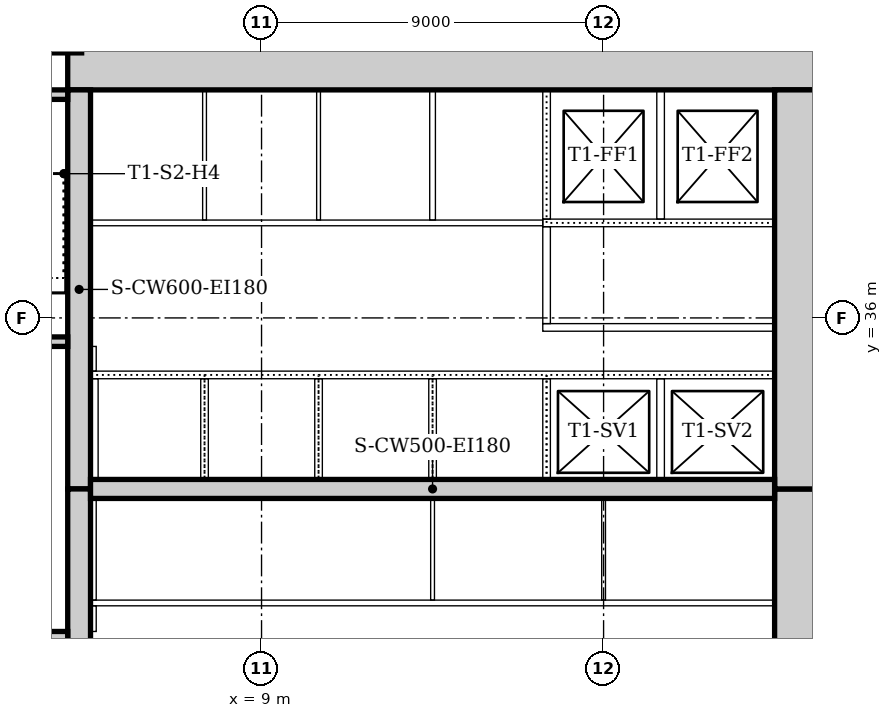
"""IFC4 building model, lengths in metres.
Left out: names, types, materials, properties, quantities, classifications, styles, units other than length and angle.
Written with IfcOpenShell. Run it as: python <this file> out.ifc"""

import sys

from ifc_helpers import new_model, si_unit, direction, frame, frame_2d, origin, origin_2d, place, context, subcontext, project, spatial, rectangle, extrude, element, fill, save


model = new_model("IFC4")
c1 = context("Model", 3, precision=1e-05, world=origin(), true_north=direction((0.0, 1.0)))
c2 = subcontext(c1, "Body", "Model", "MODEL_VIEW")
j1 = project(units=[si_unit("LENGTHUNIT", "METRE"), si_unit("PLANEANGLEUNIT", "RADIAN")], contexts=[c1])
p1 = place(None, origin())
s1 = spatial("IfcSite", under=j1, at=p1, CompositionType="ELEMENT")
p2 = place(p1, origin())
s2 = spatial("IfcBuilding", under=s1, at=p2, CompositionType="ELEMENT")
p3 = place(p2, frame((0.0, 0.0, -5.0)))
s3 = spatial("IfcBuildingStorey", under=s2, at=p3, CompositionType="ELEMENT", Elevation=-5.0)
p4 = place(p3, frame((23.7, 42.6, 0.0), z_axis=(0.0, 0.0, 1.0), x_axis=(-1.0, 0.0, 0.0)))
e1 = element("IfcWall", 1, at=p4, inside=s3, PredefinedType="SOLIDWALL", context=c2, shape_type="SweptSolid", body=[
    extrude(rectangle(XDim=19.8, YDim=1.2, at=frame_2d((9.9, 0.0))), origin(), (0.0, 0.0, 1.0), 5.0),
])
p5 = place(p3, frame((23.1, 21.0, 0.0), z_axis=(0.0, 0.0, 1.0), x_axis=(0.0, 1.0, 0.0)))
e2 = element("IfcWall", 2, at=p5, inside=s3, PredefinedType="SOLIDWALL", context=c2, shape_type="SweptSolid", body=[
    extrude(rectangle(XDim=10.5, YDim=1.2, at=frame_2d((5.25, 0.0))), origin(), (0.0, 0.0, 1.0), 5.0),
])
p6 = place(p5, frame((4.35, 0.0, 0.0)))
e3 = element("IfcOpeningElement", 3, at=p6, cuts=e2, PredefinedType="OPENING", context=c2, shape_type="SweptSolid", body=[
    extrude(rectangle(XDim=1.8, YDim=2.1, at=frame_2d((0.9, 1.05))), frame((0.0, 0.61, 0.0), z_axis=(0.0, -1.0, 0.0), x_axis=(1.0, 0.0, 0.0)), (0.0, 0.0, 1.0), 1.22),
])
p7 = place(p3, frame((23.1, 31.5, 0.0), z_axis=(0.0, 0.0, 1.0), x_axis=(0.0, 1.0, 0.0)))
e4 = element("IfcWall", 4, at=p7, inside=s3, PredefinedType="SOLIDWALL", context=c2, shape_type="SweptSolid", body=[
    extrude(rectangle(XDim=10.5, YDim=1.2, at=frame_2d((5.25, 0.0))), origin(), (0.0, 0.0, 1.0), 5.0),
])
p8 = place(p7, frame((3.15, 0.0, 0.0)))
e5 = element("IfcOpeningElement", 5, at=p8, cuts=e4, PredefinedType="OPENING", context=c2, shape_type="SweptSolid", body=[
    extrude(rectangle(XDim=1.0, YDim=2.1, at=frame_2d((0.5, 1.05))), frame((0.0, 0.61, 0.0), z_axis=(0.0, -1.0, 0.0), x_axis=(1.0, 0.0, 0.0)), (0.0, 0.0, 1.0), 1.22),
])
p9 = place(p7, frame((5.2, 0.0, 0.0)))
e6 = element("IfcOpeningElement", 6, at=p9, cuts=e4, PredefinedType="OPENING", context=c2, shape_type="SweptSolid", body=[
    extrude(rectangle(XDim=1.0, YDim=2.1, at=frame_2d((0.5, 1.05))), frame((0.0, 0.61, 0.0), z_axis=(0.0, -1.0, 0.0), x_axis=(1.0, 0.0, 0.0)), (0.0, 0.0, 1.0), 1.22),
])
p10 = place(p3, frame((4.2, 42.0, 0.0), z_axis=(0.0, 0.0, 1.0), x_axis=(0.0, -1.0, 0.0)))
e7 = element("IfcWall", 7, at=p10, inside=s3, PredefinedType="SOLIDWALL", context=c2, shape_type="SweptSolid", body=[
    extrude(rectangle(XDim=10.5, YDim=0.6, at=frame_2d((5.25, 0.0))), origin(), (0.0, 0.0, 1.0), 5.0),
])
p11 = place(p10, frame((5.3, 0.0, 0.0)))
e8 = element("IfcOpeningElement", 8, at=p11, cuts=e7, PredefinedType="OPENING", context=c2, shape_type="SweptSolid", body=[
    extrude(rectangle(XDim=1.0, YDim=2.1, at=frame_2d((0.5, 1.05))), frame((0.0, 0.31, 0.0), z_axis=(0.0, -1.0, 0.0), x_axis=(1.0, 0.0, 0.0)), (0.0, 0.0, 1.0), 0.62),
])
p12 = place(p3, frame((4.2, 31.5, 0.0), z_axis=(0.0, 0.0, 1.0), x_axis=(0.0, -1.0, 0.0)))
e9 = element("IfcWall", 9, at=p12, inside=s3, PredefinedType="SOLIDWALL", context=c2, shape_type="SweptSolid", body=[
    extrude(rectangle(XDim=10.5, YDim=0.6, at=frame_2d((5.25, 0.0))), origin(), (0.0, 0.0, 1.0), 5.0),
])
p13 = place(p12, frame((4.25, 0.0, 0.0)))
e10 = element("IfcOpeningElement", 10, at=p13, cuts=e9, PredefinedType="OPENING", context=c2, shape_type="SweptSolid", body=[
    extrude(rectangle(XDim=1.0, YDim=2.1, at=frame_2d((0.5, 1.05))), frame((0.0, 0.31, 0.0), z_axis=(0.0, -1.0, 0.0), x_axis=(1.0, 0.0, 0.0)), (0.0, 0.0, 1.0), 0.62),
])
p14 = place(p3, frame((4.5, 31.5, 0.0), z_axis=(0.0, 0.0, 1.0), x_axis=(1.0, 0.0, 0.0)))
e11 = element("IfcWall", 11, at=p14, inside=s3, PredefinedType="SOLIDWALL", context=c2, shape_type="SweptSolid", body=[
    extrude(rectangle(XDim=18.0, YDim=0.5, at=frame_2d((9.0, 0.0))), origin(), (0.0, 0.0, 1.0), 5.0),
])
p15 = place(p3, frame((3.9, 27.625, 0.0), z_axis=(0.0, 0.0, 1.0), x_axis=(-1.0, 0.0, 0.0)))
e12 = element("IfcWall", 12, at=p15, inside=s3, PredefinedType="SOLIDWALL", context=c2, shape_type="SweptSolid", body=[
    extrude(rectangle(XDim=3.54, YDim=0.25, at=frame_2d((1.77, 0.0))), origin(), (0.0, 0.0, 1.0), 5.0),
])
p16 = place(p15, frame((0.4, 0.0, 0.0)))
e13 = element("IfcOpeningElement", 13, at=p16, cuts=e12, PredefinedType="OPENING", context=c2, shape_type="SweptSolid", body=[
    extrude(rectangle(XDim=1.0, YDim=2.1, at=frame_2d((0.5, 1.05))), frame((0.0, 0.135, 0.0), z_axis=(0.0, -1.0, 0.0), x_axis=(1.0, 0.0, 0.0)), (0.0, 0.0, 1.0), 0.27),
])
p17 = place(p3, frame((0.36, 35.375, 0.0), z_axis=(0.0, 0.0, 1.0), x_axis=(1.0, 0.0, 0.0)))
e14 = element("IfcWall", 14, at=p17, inside=s3, PredefinedType="SOLIDWALL", context=c2, shape_type="SweptSolid", body=[
    extrude(rectangle(XDim=3.54, YDim=0.25, at=frame_2d((1.77, 0.0))), origin(), (0.0, 0.0, 1.0), 5.0),
])
p18 = place(p17, frame((2.14, 0.0, 0.0)))
e15 = element("IfcOpeningElement", 15, at=p18, cuts=e14, PredefinedType="OPENING", context=c2, shape_type="SweptSolid", body=[
    extrude(rectangle(XDim=1.0, YDim=2.1, at=frame_2d((0.5, 1.05))), frame((0.0, 0.135, 0.0), z_axis=(0.0, -1.0, 0.0), x_axis=(1.0, 0.0, 0.0)), (0.0, 0.0, 1.0), 0.27),
])
p19 = place(p3, frame((3.9, 41.875, 0.0), z_axis=(0.0, 0.0, 1.0), x_axis=(-1.0, 0.0, 0.0)))
e16 = element("IfcWall", 16, at=p19, inside=s3, PredefinedType="SOLIDWALL", context=c2, shape_type="SweptSolid", body=[
    extrude(rectangle(XDim=3.54, YDim=0.25, at=frame_2d((1.77, 0.0))), origin(), (0.0, 0.0, 1.0), 5.0),
])
p20 = place(p3, frame((3.667, 43.574, 0.0), z_axis=(0.0, 0.0, 1.0), x_axis=(1.0, 0.0, 0.0)))
e17 = element("IfcColumn", 17, at=p20, inside=s3, PredefinedType="COLUMN", context=c2, shape_type="SweptSolid", body=[
    extrude(rectangle(XDim=1.2, YDim=1.2, at=origin_2d()), origin(), (0.0, 0.0, 1.0), 4.7),
])
p21 = place(p3, frame((16.4, 35.75, 0.0), z_axis=(0.0, 0.0, 1.0), x_axis=(1.0, 0.0, 0.0)))
e18 = element("IfcWall", 18, at=p21, inside=s3, PredefinedType="PARTITIONING", context=c2, shape_type="SweptSolid", body=[
    extrude(rectangle(XDim=6.1, YDim=0.2, at=frame_2d((3.05, 0.0))), origin(), (0.0, 0.0, 1.0), 4.7),
])
p22 = place(p3, frame((16.4, 38.5, 0.0), z_axis=(0.0, 0.0, 1.0), x_axis=(1.0, 0.0, 0.0)))
e19 = element("IfcWall", 19, at=p22, inside=s3, PredefinedType="PARTITIONING", context=c2, shape_type="SweptSolid", body=[
    extrude(rectangle(XDim=6.1, YDim=0.2, at=frame_2d((3.05, 0.0))), origin(), (0.0, 0.0, 1.0), 4.7),
])
p23 = place(p22, frame((1.0, 0.0, 0.0)))
e20 = element("IfcOpeningElement", 20, at=p23, cuts=e19, PredefinedType="OPENING", context=c2, shape_type="SweptSolid", body=[
    extrude(rectangle(XDim=1.2, YDim=2.1, at=frame_2d((0.6, 1.05))), frame((0.0, 0.11, 0.0), z_axis=(0.0, -1.0, 0.0), x_axis=(1.0, 0.0, 0.0)), (0.0, 0.0, 1.0), 0.22),
])
p24 = place(p22, frame((4.0, 0.0, 0.0)))
e21 = element("IfcOpeningElement", 21, at=p24, cuts=e19, PredefinedType="OPENING", context=c2, shape_type="SweptSolid", body=[
    extrude(rectangle(XDim=1.2, YDim=2.1, at=frame_2d((0.6, 1.05))), frame((0.0, 0.11, 0.0), z_axis=(0.0, -1.0, 0.0), x_axis=(1.0, 0.0, 0.0)), (0.0, 0.0, 1.0), 0.22),
])
p25 = place(p3, frame((16.5, 35.85, 0.0), z_axis=(0.0, 0.0, 1.0), x_axis=(0.0, 1.0, 0.0)))
e22 = element("IfcWall", 22, at=p25, inside=s3, PredefinedType="PARTITIONING", context=c2, shape_type="SweptSolid", body=[
    extrude(rectangle(XDim=2.55, YDim=0.2, at=frame_2d((1.275, 0.0))), origin(), (0.0, 0.0, 1.0), 4.7),
])
p26 = place(p3, frame((4.5, 34.5, 0.0), z_axis=(0.0, 0.0, 1.0), x_axis=(1.0, 0.0, 0.0)))
e23 = element("IfcWall", 23, at=p26, inside=s3, PredefinedType="PARTITIONING", context=c2, shape_type="SweptSolid", body=[
    extrude(rectangle(XDim=18.0, YDim=0.2, at=frame_2d((9.0, 0.0))), origin(), (0.0, 0.0, 1.0), 4.7),
])
p27 = place(p26, frame((12.95, 0.0, 0.0)))
e24 = element("IfcOpeningElement", 24, at=p27, cuts=e23, PredefinedType="OPENING", context=c2, shape_type="SweptSolid", body=[
    extrude(rectangle(XDim=1.1, YDim=2.1, at=frame_2d((0.55, 1.05))), frame((0.0, 0.11, 0.0), z_axis=(0.0, -1.0, 0.0), x_axis=(1.0, 0.0, 0.0)), (0.0, 0.0, 1.0), 0.22),
])
p28 = place(p26, frame((15.95, 0.0, 0.0)))
e25 = element("IfcOpeningElement", 25, at=p28, cuts=e23, PredefinedType="OPENING", context=c2, shape_type="SweptSolid", body=[
    extrude(rectangle(XDim=1.1, YDim=2.1, at=frame_2d((0.55, 1.05))), frame((0.0, 0.11, 0.0), z_axis=(0.0, -1.0, 0.0), x_axis=(1.0, 0.0, 0.0)), (0.0, 0.0, 1.0), 0.22),
])
for number, where, z_axis, x_axis in (
    (26, (16.5, 38.6, 0.0), (0.0, 0.0, 1.0), (0.0, 1.0, 0.0)),
    (27, (19.5, 38.6, 0.0), (0.0, 0.0, 1.0), (0.0, 1.0, 0.0)),
):
    element("IfcWall", number, at=place(p3, frame(where, z_axis=z_axis, x_axis=x_axis)), inside=s3, PredefinedType="PARTITIONING", context=c2, shape_type="SweptSolid", body=[
        extrude(rectangle(XDim=3.4, YDim=0.2, at=frame_2d((1.7, 0.0))), origin(), (0.0, 0.0, 1.0), 4.7),
    ])
for number, where, z_axis, x_axis in (
    (28, (4.6, 31.75, 0.0), (0.0, 0.0, 1.0), (0.0, 1.0, 0.0)),
    (29, (7.5, 31.75, 0.0), (0.0, 0.0, 1.0), (0.0, 1.0, 0.0)),
    (30, (10.5, 31.75, 0.0), (0.0, 0.0, 1.0), (0.0, 1.0, 0.0)),
    (31, (13.5, 31.75, 0.0), (0.0, 0.0, 1.0), (0.0, 1.0, 0.0)),
    (32, (16.5, 31.75, 0.0), (0.0, 0.0, 1.0), (0.0, 1.0, 0.0)),
    (33, (19.5, 31.75, 0.0), (0.0, 0.0, 1.0), (0.0, 1.0, 0.0)),
):
    element("IfcWall", number, at=place(p3, frame(where, z_axis=z_axis, x_axis=x_axis)), inside=s3, PredefinedType="PARTITIONING", context=c2, shape_type="SweptSolid", body=[
        extrude(rectangle(XDim=2.65, YDim=0.2, at=frame_2d((1.325, 0.0))), origin(), (0.0, 0.0, 1.0), 4.7),
    ])
p29 = place(p3, frame((4.5, 28.5, 0.0), z_axis=(0.0, 0.0, 1.0), x_axis=(1.0, 0.0, 0.0)))
e34 = element("IfcWall", 34, at=p29, inside=s3, PredefinedType="PARTITIONING", context=c2, shape_type="SweptSolid", body=[
    extrude(rectangle(XDim=18.0, YDim=0.15, at=frame_2d((9.0, 0.0))), origin(), (0.0, 0.0, 1.0), 4.7),
])
p30 = place(p29, frame((4.1, 0.0, 0.0)))
e35 = element("IfcOpeningElement", 35, at=p30, cuts=e34, PredefinedType="OPENING", context=c2, shape_type="SweptSolid", body=[
    extrude(rectangle(XDim=0.9, YDim=2.1, at=frame_2d((0.45, 1.05))), frame((0.0, 0.085, 0.0), z_axis=(0.0, -1.0, 0.0), x_axis=(1.0, 0.0, 0.0)), (0.0, 0.0, 1.0), 0.17),
])
p31 = place(p29, frame((10.8, 0.0, 0.0)))
e36 = element("IfcOpeningElement", 36, at=p31, cuts=e34, PredefinedType="OPENING", context=c2, shape_type="SweptSolid", body=[
    extrude(rectangle(XDim=0.9, YDim=2.1, at=frame_2d((0.45, 1.05))), frame((0.0, 0.085, 0.0), z_axis=(0.0, -1.0, 0.0), x_axis=(1.0, 0.0, 0.0)), (0.0, 0.0, 1.0), 0.17),
])
p32 = place(p29, frame((15.2, 0.0, 0.0)))
e37 = element("IfcOpeningElement", 37, at=p32, cuts=e34, PredefinedType="OPENING", context=c2, shape_type="SweptSolid", body=[
    extrude(rectangle(XDim=0.9, YDim=2.1, at=frame_2d((0.45, 1.05))), frame((0.0, 0.085, 0.0), z_axis=(0.0, -1.0, 0.0), x_axis=(1.0, 0.0, 0.0)), (0.0, 0.0, 1.0), 0.17),
])
p33 = place(p3, frame((4.5, 38.5, 0.0), z_axis=(0.0, 0.0, 1.0), x_axis=(1.0, 0.0, 0.0)))
e38 = element("IfcWall", 38, at=p33, inside=s3, PredefinedType="PARTITIONING", context=c2, shape_type="SweptSolid", body=[
    extrude(rectangle(XDim=11.9, YDim=0.15, at=frame_2d((5.95, 0.0))), origin(), (0.0, 0.0, 1.0), 4.7),
])
p34 = place(p33, frame((1.1, 0.0, 0.0)))
e39 = element("IfcOpeningElement", 39, at=p34, cuts=e38, PredefinedType="OPENING", context=c2, shape_type="SweptSolid", body=[
    extrude(rectangle(XDim=0.9, YDim=2.1, at=frame_2d((0.45, 1.05))), frame((0.0, 0.085, 0.0), z_axis=(0.0, -1.0, 0.0), x_axis=(1.0, 0.0, 0.0)), (0.0, 0.0, 1.0), 0.17),
])
p35 = place(p33, frame((4.05, 0.0, 0.0)))
e40 = element("IfcOpeningElement", 40, at=p35, cuts=e38, PredefinedType="OPENING", context=c2, shape_type="SweptSolid", body=[
    extrude(rectangle(XDim=0.9, YDim=2.1, at=frame_2d((0.45, 1.05))), frame((0.0, 0.085, 0.0), z_axis=(0.0, -1.0, 0.0), x_axis=(1.0, 0.0, 0.0)), (0.0, 0.0, 1.0), 0.17),
])
p36 = place(p33, frame((7.05, 0.0, 0.0)))
e41 = element("IfcOpeningElement", 41, at=p36, cuts=e38, PredefinedType="OPENING", context=c2, shape_type="SweptSolid", body=[
    extrude(rectangle(XDim=0.9, YDim=2.1, at=frame_2d((0.45, 1.05))), frame((0.0, 0.085, 0.0), z_axis=(0.0, -1.0, 0.0), x_axis=(1.0, 0.0, 0.0)), (0.0, 0.0, 1.0), 0.17),
])
p37 = place(p33, frame((9.95, 0.0, 0.0)))
e42 = element("IfcOpeningElement", 42, at=p37, cuts=e38, PredefinedType="OPENING", context=c2, shape_type="SweptSolid", body=[
    extrude(rectangle(XDim=0.8, YDim=2.1, at=frame_2d((0.4, 1.05))), frame((0.0, 0.085, 0.0), z_axis=(0.0, -1.0, 0.0), x_axis=(1.0, 0.0, 0.0)), (0.0, 0.0, 1.0), 0.17),
])
p38 = place(p3, frame((4.575, 27.75, 0.0), z_axis=(0.0, 0.0, 1.0), x_axis=(0.0, 1.0, 0.0)))
e43 = element("IfcWall", 43, at=p38, inside=s3, PredefinedType="PARTITIONING", context=c2, shape_type="SweptSolid", body=[
    extrude(rectangle(XDim=0.675, YDim=0.15, at=frame_2d((0.338, 0.0))), origin(), (0.0, 0.0, 1.0), 4.7),
])
p39 = place(p3, frame((4.575, 28.575, 0.0), z_axis=(0.0, 0.0, 1.0), x_axis=(0.0, 1.0, 0.0)))
e44 = element("IfcWall", 44, at=p39, inside=s3, PredefinedType="PARTITIONING", context=c2, shape_type="SweptSolid", body=[
    extrude(rectangle(XDim=2.675, YDim=0.15, at=frame_2d((1.337, 0.0))), origin(), (0.0, 0.0, 1.0), 4.7),
])
p40 = place(p3, frame((4.575, 34.6, 0.0), z_axis=(0.0, 0.0, 1.0), x_axis=(0.0, 1.0, 0.0)))
e45 = element("IfcWall", 45, at=p40, inside=s3, PredefinedType="PARTITIONING", context=c2, shape_type="SweptSolid", body=[
    extrude(rectangle(XDim=0.65, YDim=0.15, at=frame_2d((0.325, 0.0))), origin(), (0.0, 0.0, 1.0), 4.7),
])
p41 = place(p3, frame((13.5, 38.575, 0.0), z_axis=(0.0, 0.0, 1.0), x_axis=(0.0, 1.0, 0.0)))
e46 = element("IfcWall", 46, at=p41, inside=s3, PredefinedType="PARTITIONING", context=c2, shape_type="SweptSolid", body=[
    extrude(rectangle(XDim=3.425, YDim=0.15, at=frame_2d((1.712, 0.0))), origin(), (0.0, 0.0, 1.0), 4.7),
])
for number, where, z_axis, x_axis in (
    (47, (7.5, 38.575, 0.0), (0.0, 0.0, 1.0), (0.0, 1.0, 0.0)),
    (48, (10.5, 38.575, 0.0), (0.0, 0.0, 1.0), (0.0, 1.0, 0.0)),
):
    element("IfcWall", number, at=place(p3, frame(where, z_axis=z_axis, x_axis=x_axis)), inside=s3, PredefinedType="PARTITIONING", context=c2, shape_type="SweptSolid", body=[
        extrude(rectangle(XDim=3.425, YDim=0.1, at=frame_2d((1.712, 0.0))), origin(), (0.0, 0.0, 1.0), 4.7),
    ])
for number, where, z_axis, x_axis in (
    (49, (13.5, 28.575, 0.0), (0.0, 0.0, 1.0), (0.0, 1.0, 0.0)),
    (50, (18.0, 28.575, 0.0), (0.0, 0.0, 1.0), (0.0, 1.0, 0.0)),
):
    element("IfcWall", number, at=place(p3, frame(where, z_axis=z_axis, x_axis=x_axis)), inside=s3, PredefinedType="PARTITIONING", context=c2, shape_type="SweptSolid", body=[
        extrude(rectangle(XDim=2.675, YDim=0.1, at=frame_2d((1.337, 0.0))), origin(), (0.0, 0.0, 1.0), 4.7),
    ])
p42 = place(p11, frame((1.0, 0.0, 0.0), z_axis=(0.0, 0.0, 1.0), x_axis=(-1.0, 0.0, 0.0)))
e51 = element("IfcDoor", 51, at=p42, inside=s3, OperationType="SINGLE_SWING_LEFT", PredefinedType="DOOR", context=c2, shape_type="SweptSolid", body=[
    extrude(rectangle(XDim=1.0, YDim=2.1, at=frame_2d((0.5, 1.05))), frame((0.0, 0.025, 0.0), z_axis=(0.0, -1.0, 0.0), x_axis=(1.0, 0.0, 0.0)), (0.0, 0.0, 1.0), 0.05),
])
fill(e8, e51)
p43 = place(p27, origin())
e52 = element("IfcDoor", 52, at=p43, inside=s3, OperationType="SLIDING_TO_LEFT", PredefinedType="DOOR", context=c2, shape_type="SweptSolid", body=[
    extrude(rectangle(XDim=1.1, YDim=2.1, at=frame_2d((0.55, 1.05))), frame((0.0, 0.025, 0.0), z_axis=(0.0, -1.0, 0.0), x_axis=(1.0, 0.0, 0.0)), (0.0, 0.0, 1.0), 0.05),
])
fill(e24, e52)
p44 = place(p28, origin())
e53 = element("IfcDoor", 53, at=p44, inside=s3, OperationType="SLIDING_TO_LEFT", PredefinedType="DOOR", context=c2, shape_type="SweptSolid", body=[
    extrude(rectangle(XDim=1.1, YDim=2.1, at=frame_2d((0.55, 1.05))), frame((0.0, 0.025, 0.0), z_axis=(0.0, -1.0, 0.0), x_axis=(1.0, 0.0, 0.0)), (0.0, 0.0, 1.0), 0.05),
])
fill(e25, e53)
p45 = place(p23, origin())
e54 = element("IfcDoor", 54, at=p45, inside=s3, OperationType="SLIDING_TO_LEFT", PredefinedType="DOOR", context=c2, shape_type="SweptSolid", body=[
    extrude(rectangle(XDim=1.2, YDim=2.1, at=frame_2d((0.6, 1.05))), frame((0.0, 0.025, 0.0), z_axis=(0.0, -1.0, 0.0), x_axis=(1.0, 0.0, 0.0)), (0.0, 0.0, 1.0), 0.05),
])
fill(e20, e54)
p46 = place(p24, origin())
e55 = element("IfcDoor", 55, at=p46, inside=s3, OperationType="SLIDING_TO_LEFT", PredefinedType="DOOR", context=c2, shape_type="SweptSolid", body=[
    extrude(rectangle(XDim=1.2, YDim=2.1, at=frame_2d((0.6, 1.05))), frame((0.0, 0.025, 0.0), z_axis=(0.0, -1.0, 0.0), x_axis=(1.0, 0.0, 0.0)), (0.0, 0.0, 1.0), 0.05),
])
fill(e21, e55)
p47 = place(p8, frame((1.0, 0.0, 0.0), z_axis=(0.0, 0.0, 1.0), x_axis=(-1.0, 0.0, 0.0)))
e56 = element("IfcDoor", 56, at=p47, inside=s3, OperationType="SINGLE_SWING_RIGHT", PredefinedType="DOOR", context=c2, shape_type="SweptSolid", body=[
    extrude(rectangle(XDim=1.0, YDim=2.1, at=frame_2d((0.5, 1.05))), frame((0.0, 0.025, 0.0), z_axis=(0.0, -1.0, 0.0), x_axis=(1.0, 0.0, 0.0)), (0.0, 0.0, 1.0), 0.05),
])
fill(e5, e56)
p48 = place(p9, frame((1.0, 0.0, 0.0), z_axis=(0.0, 0.0, 1.0), x_axis=(-1.0, 0.0, 0.0)))
e57 = element("IfcDoor", 57, at=p48, inside=s3, OperationType="SINGLE_SWING_LEFT", PredefinedType="DOOR", context=c2, shape_type="SweptSolid", body=[
    extrude(rectangle(XDim=1.0, YDim=2.1, at=frame_2d((0.5, 1.05))), frame((0.0, 0.025, 0.0), z_axis=(0.0, -1.0, 0.0), x_axis=(1.0, 0.0, 0.0)), (0.0, 0.0, 1.0), 0.05),
])
fill(e6, e57)
p49 = place(p30, origin())
e58 = element("IfcDoor", 58, at=p49, inside=s3, OperationType="SINGLE_SWING_RIGHT", PredefinedType="DOOR", context=c2, shape_type="SweptSolid", body=[
    extrude(rectangle(XDim=0.9, YDim=2.1, at=frame_2d((0.45, 1.05))), frame((0.0, 0.025, 0.0), z_axis=(0.0, -1.0, 0.0), x_axis=(1.0, 0.0, 0.0)), (0.0, 0.0, 1.0), 0.05),
])
fill(e35, e58)
p50 = place(p31, origin())
e59 = element("IfcDoor", 59, at=p50, inside=s3, OperationType="SINGLE_SWING_LEFT", PredefinedType="DOOR", context=c2, shape_type="SweptSolid", body=[
    extrude(rectangle(XDim=0.9, YDim=2.1, at=frame_2d((0.45, 1.05))), frame((0.0, 0.025, 0.0), z_axis=(0.0, -1.0, 0.0), x_axis=(1.0, 0.0, 0.0)), (0.0, 0.0, 1.0), 0.05),
])
fill(e36, e59)
p51 = place(p32, origin())
e60 = element("IfcDoor", 60, at=p51, inside=s3, OperationType="SINGLE_SWING_RIGHT", PredefinedType="DOOR", context=c2, shape_type="SweptSolid", body=[
    extrude(rectangle(XDim=0.9, YDim=2.1, at=frame_2d((0.45, 1.05))), frame((0.0, 0.025, 0.0), z_axis=(0.0, -1.0, 0.0), x_axis=(1.0, 0.0, 0.0)), (0.0, 0.0, 1.0), 0.05),
])
fill(e37, e60)
p52 = place(p34, origin())
e61 = element("IfcDoor", 61, at=p52, inside=s3, OperationType="SINGLE_SWING_LEFT", PredefinedType="DOOR", context=c2, shape_type="SweptSolid", body=[
    extrude(rectangle(XDim=0.9, YDim=2.1, at=frame_2d((0.45, 1.05))), frame((0.0, 0.025, 0.0), z_axis=(0.0, -1.0, 0.0), x_axis=(1.0, 0.0, 0.0)), (0.0, 0.0, 1.0), 0.05),
])
fill(e39, e61)
p53 = place(p35, origin())
e62 = element("IfcDoor", 62, at=p53, inside=s3, OperationType="SINGLE_SWING_RIGHT", PredefinedType="DOOR", context=c2, shape_type="SweptSolid", body=[
    extrude(rectangle(XDim=0.9, YDim=2.1, at=frame_2d((0.45, 1.05))), frame((0.0, 0.025, 0.0), z_axis=(0.0, -1.0, 0.0), x_axis=(1.0, 0.0, 0.0)), (0.0, 0.0, 1.0), 0.05),
])
fill(e40, e62)
p54 = place(p36, origin())
e63 = element("IfcDoor", 63, at=p54, inside=s3, OperationType="SINGLE_SWING_RIGHT", PredefinedType="DOOR", context=c2, shape_type="SweptSolid", body=[
    extrude(rectangle(XDim=0.9, YDim=2.1, at=frame_2d((0.45, 1.05))), frame((0.0, 0.025, 0.0), z_axis=(0.0, -1.0, 0.0), x_axis=(1.0, 0.0, 0.0)), (0.0, 0.0, 1.0), 0.05),
])
fill(e41, e63)
p55 = place(p37, origin())
e64 = element("IfcDoor", 64, at=p55, inside=s3, OperationType="SINGLE_SWING_RIGHT", PredefinedType="DOOR", context=c2, shape_type="SweptSolid", body=[
    extrude(rectangle(XDim=0.8, YDim=2.1, at=frame_2d((0.4, 1.05))), frame((0.0, 0.025, 0.0), z_axis=(0.0, -1.0, 0.0), x_axis=(1.0, 0.0, 0.0)), (0.0, 0.0, 1.0), 0.05),
])
fill(e42, e64)
save(model, sys.argv[1])
